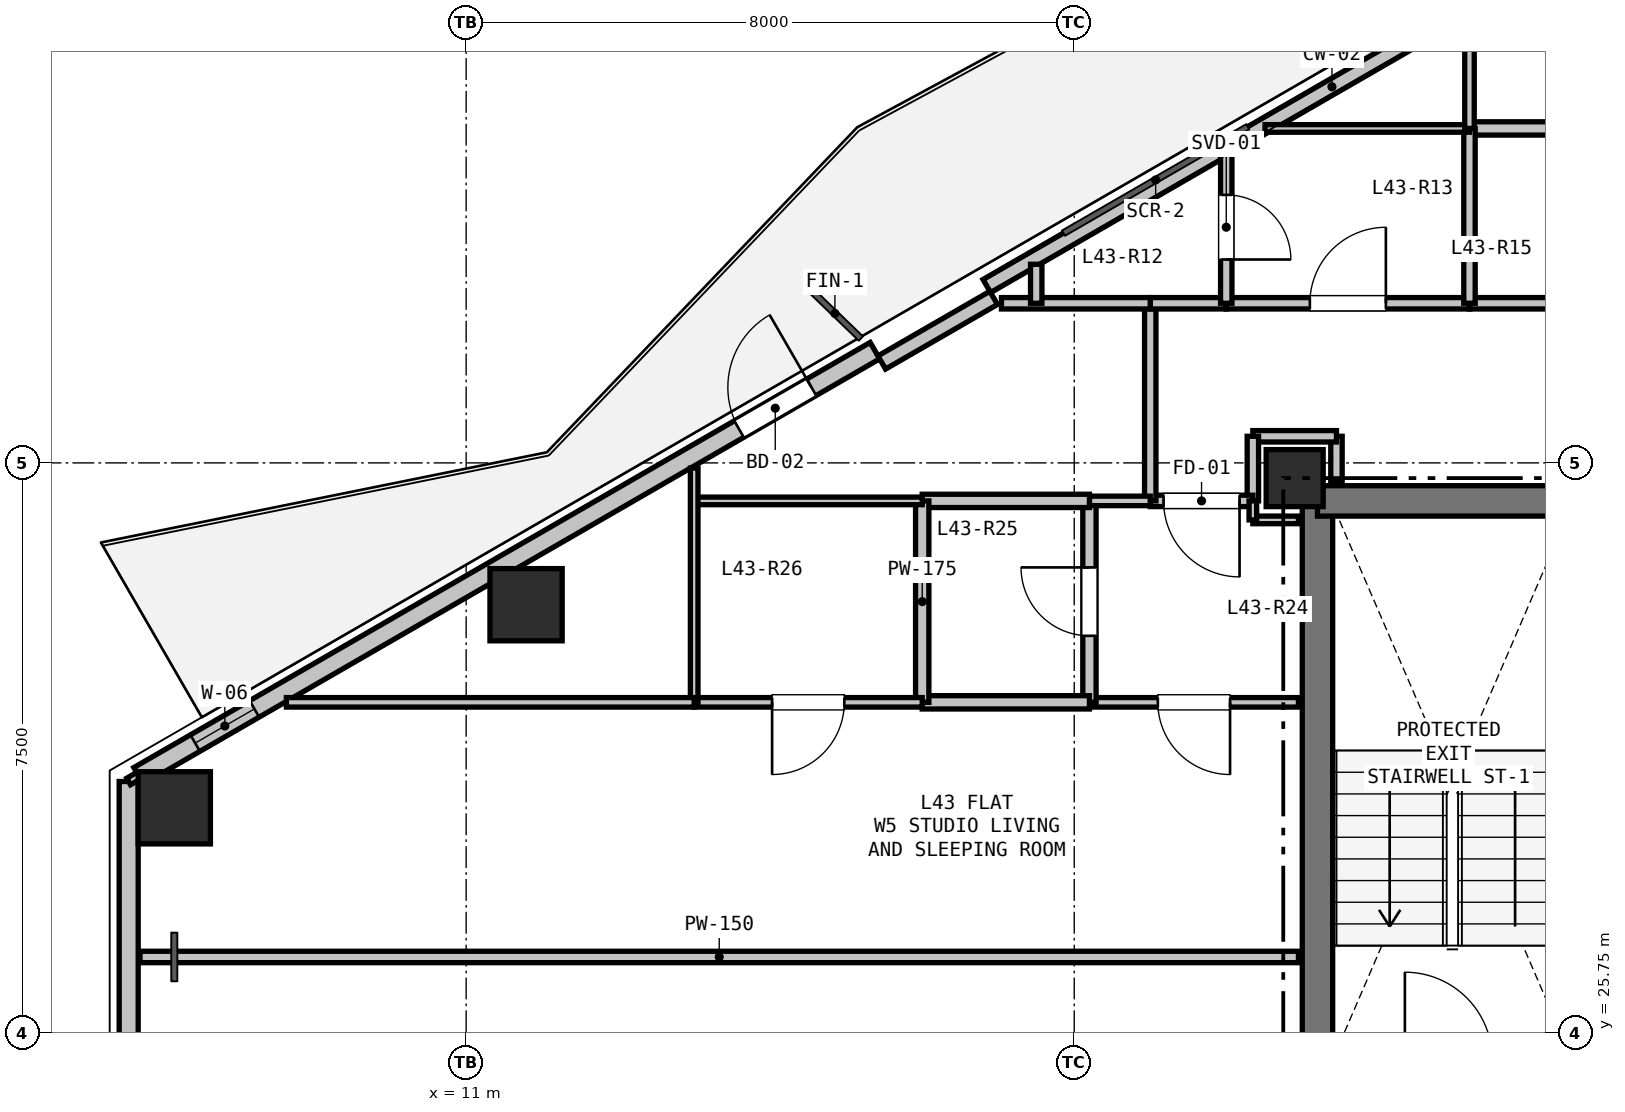
"""IFC4 building model, lengths in metres.
Left out: names, types, materials, properties, quantities, classifications, styles, units other than length and angle.
Written with IfcOpenShell. Run it as: python <this file> out.ifc"""

import sys

from ifc_helpers import new_model, si_unit, direction, frame, frame_2d, origin, origin_2d, place, context, subcontext, project, spatial, rectangle, hollow_rectangle, extrude, element, fill, save


model = new_model("IFC4")
c1 = context("Model", 3, precision=1e-05, world=origin(), true_north=direction((0.0, 1.0)))
c2 = subcontext(c1, "Body", "Model", "MODEL_VIEW")
j1 = project(units=[si_unit("LENGTHUNIT", "METRE"), si_unit("PLANEANGLEUNIT", "RADIAN")], contexts=[c1])
p1 = place(None, origin())
s1 = spatial("IfcSite", under=j1, at=p1, CompositionType="ELEMENT")
p2 = place(p1, origin())
s2 = spatial("IfcBuilding", under=s1, at=p2, CompositionType="ELEMENT")
p3 = place(p2, frame((0.0, 0.0, 154.2)))
s3 = spatial("IfcBuildingStorey", under=s2, at=p3, CompositionType="ELEMENT", Elevation=154.2)
p4 = place(p3, frame((21.9, 33.05, 0.0), z_axis=(0.0, 0.0, 1.0), x_axis=(1.0, 0.0, 0.0)))
e1 = element("IfcColumn", 1, at=p4, inside=s3, PredefinedType="COLUMN", context=c2, shape_type="SweptSolid", body=[
    extrude(rectangle(XDim=0.75, YDim=0.75, at=origin_2d()), origin(), (0.0, 0.0, 1.0), 3.3),
])
for number, where, z_axis, x_axis in (
    (2, (7.16, 28.712, 0.0), (0.0, 0.0, 1.0), (1.0, 0.0, 0.0)),
    (3, (11.788, 31.384, 0.0), (0.0, 0.0, 1.0), (1.0, 0.0, 0.0)),
):
    element("IfcColumn", number, at=place(p3, frame(where, z_axis=z_axis, x_axis=x_axis)), inside=s3, PredefinedType="COLUMN", context=c2, shape_type="SweptSolid", body=[
        extrude(hollow_rectangle(XDim=0.95, YDim=0.95, WallThickness=0.028, at=origin_2d()), origin(), (0.0, 0.0, 1.0), 3.3),
    ])
p5 = place(p3, frame((6.56, 24.441, 0.0), z_axis=(0.0, 0.0, 1.0), x_axis=(0.0, 1.0, 0.0)))
e4 = element("IfcWall", 4, at=p5, inside=s3, PredefinedType="SOLIDWALL", context=c2, shape_type="SweptSolid", body=[
    extrude(rectangle(XDim=4.617, YDim=0.25, at=frame_2d((2.309, 0.0))), origin(), (0.0, 0.0, 1.0), 2.68),
])
p6 = place(p3, frame((6.69, 29.134, 0.0), z_axis=(0.0, 0.0, 1.0), x_axis=(0.866027848477, 0.499995765644, 0.0)))
e5 = element("IfcWall", 5, at=p6, inside=s3, PredefinedType="SOLIDWALL", context=c2, shape_type="SweptSolid", body=[
    extrude(rectangle(XDim=11.186, YDim=0.25, at=frame_2d((5.593, 0.0))), origin(), (0.0, 0.0, 1.0), 2.68),
])
p7 = place(p6, frame((9.122, 0.0, 0.0)))
e6 = element("IfcOpeningElement", 6, at=p7, cuts=e5, PredefinedType="OPENING", context=c2, shape_type="SweptSolid", body=[
    extrude(rectangle(XDim=1.1, YDim=2.1, at=frame_2d((0.55, 1.05))), frame((0.0, 0.135, 0.0), z_axis=(0.0, -1.0, 0.0), x_axis=(1.0, 0.0, 0.0)), (0.0, 0.0, 1.0), 0.27),
])
p8 = place(p6, frame((0.86, 0.0, 0.9)))
e7 = element("IfcOpeningElement", 7, at=p8, cuts=e5, PredefinedType="OPENING", context=c2, shape_type="SweptSolid", body=[
    extrude(rectangle(XDim=0.9, YDim=1.4, at=frame_2d((0.45, 0.7))), frame((0.0, 0.135, 0.0), z_axis=(0.0, -1.0, 0.0), x_axis=(1.0, 0.0, 0.0)), (0.0, 0.0, 1.0), 0.27),
])
p9 = place(p3, frame((17.85, 35.577, 0.0), z_axis=(0.0, 0.0, 1.0), x_axis=(0.866026619769, 0.499997893847, 0.0)))
e8 = element("IfcWall", 8, at=p9, inside=s3, PredefinedType="PARAPET", context=c2, shape_type="SweptSolid", body=[
    extrude(rectangle(XDim=10.486, YDim=0.2, at=frame_2d((5.243, 0.0))), origin(), (0.0, 0.0, 1.0), 0.2),
])
p10 = place(p3, frame((16.468, 34.571, 0.0), z_axis=(0.0, 0.0, 1.0), x_axis=(0.865989465428, 0.500062241894, 0.0)))
e9 = element("IfcWall", 9, at=p10, inside=s3, PredefinedType="PARAPET", context=c2, shape_type="SweptSolid", body=[
    extrude(rectangle(XDim=1.7, YDim=0.2, at=frame_2d((0.85, 0.0))), origin(), (0.0, 0.0, 1.0), 2.68),
])
p11 = place(p3, frame((22.2, 25.4, 0.0), z_axis=(0.0, 0.0, 1.0), x_axis=(0.0, 1.0, 0.0)))
e10 = element("IfcWall", 10, at=p11, inside=s3, PredefinedType="SHEAR", context=c2, shape_type="SweptSolid", body=[
    extrude(rectangle(XDim=7.35, YDim=0.4, at=frame_2d((3.675, 0.0))), origin(), (0.0, 0.0, 1.0), 3.06),
])
p12 = place(p3, frame((22.2, 32.75, 0.0), z_axis=(0.0, 0.0, 1.0), x_axis=(1.0, 0.0, 0.0)))
e11 = element("IfcWall", 11, at=p12, inside=s3, PredefinedType="SHEAR", context=c2, shape_type="SweptSolid", body=[
    extrude(rectangle(XDim=3.45, YDim=0.4, at=frame_2d((1.725, 0.0))), origin(), (0.0, 0.0, 1.0), 3.06),
])
p13 = place(p3, frame((22.45, 33.0, 0.0), z_axis=(0.0, 0.0, 1.0), x_axis=(0.0, 1.0, 0.0)))
e12 = element("IfcWall", 12, at=p13, inside=s3, PredefinedType="PARTITIONING", context=c2, shape_type="SweptSolid", body=[
    extrude(rectangle(XDim=0.6, YDim=0.15, at=frame_2d((0.3, 0.0))), origin(), (0.0, 0.0, 1.0), 2.585),
])
p14 = place(p3, frame((22.45, 33.6, 0.0), z_axis=(0.0, 0.0, 1.0), x_axis=(-1.0, 0.0, 0.0)))
e13 = element("IfcWall", 13, at=p14, inside=s3, PredefinedType="PARTITIONING", context=c2, shape_type="SweptSolid", body=[
    extrude(rectangle(XDim=1.1, YDim=0.15, at=frame_2d((0.55, 0.0))), origin(), (0.0, 0.0, 1.0), 3.06),
])
p15 = place(p3, frame((21.35, 33.6, 0.0), z_axis=(0.0, 0.0, 1.0), x_axis=(0.0, -1.0, 0.0)))
e14 = element("IfcWall", 14, at=p15, inside=s3, PredefinedType="PARTITIONING", context=c2, shape_type="SweptSolid", body=[
    extrude(rectangle(XDim=0.85, YDim=0.15, at=frame_2d((0.425, 0.0))), origin(), (0.0, 0.0, 1.0), 2.433),
])
p16 = place(p3, frame((21.35, 32.75, 0.0), z_axis=(0.0, 0.0, 1.0), x_axis=(-1.0, 0.0, 0.0)))
e15 = element("IfcWall", 15, at=p16, inside=s3, PredefinedType="PARTITIONING", context=c2, shape_type="SweptSolid", body=[
    extrude(rectangle(XDim=1.35, YDim=0.15, at=frame_2d((0.675, 0.0))), origin(), (0.0, 0.0, 1.0), 2.433),
])
p17 = place(p16, frame((0.175, 0.0, 0.0)))
e16 = element("IfcOpeningElement", 16, at=p17, cuts=e15, PredefinedType="OPENING", context=c2, shape_type="SweptSolid", body=[
    extrude(rectangle(XDim=1.0, YDim=2.15, at=frame_2d((0.5, 1.075))), frame((0.0, 0.085, 0.0), z_axis=(0.0, -1.0, 0.0), x_axis=(1.0, 0.0, 0.0)), (0.0, 0.0, 1.0), 0.17),
])
p18 = place(p3, frame((20.0, 32.75, 0.0), z_axis=(0.0, 0.0, 1.0), x_axis=(0.0, 1.0, 0.0)))
e17 = element("IfcWall", 17, at=p18, inside=s3, PredefinedType="PARTITIONING", context=c2, shape_type="SweptSolid", body=[
    extrude(rectangle(XDim=2.6, YDim=0.15, at=frame_2d((1.3, 0.0))), origin(), (0.0, 0.0, 1.0), 2.433),
])
p19 = place(p3, frame((20.0, 35.35, 0.0), z_axis=(0.0, 0.0, 1.0), x_axis=(1.0, 0.0, 0.0)))
e18 = element("IfcWall", 18, at=p19, inside=s3, PredefinedType="PARTITIONING", context=c2, shape_type="SweptSolid", body=[
    extrude(rectangle(XDim=1.0, YDim=0.15, at=frame_2d((0.5, 0.0))), origin(), (0.0, 0.0, 1.0), 3.06),
])
p20 = place(p3, frame((21.0, 35.35, 0.0), z_axis=(0.0, 0.0, 1.0), x_axis=(1.0, 0.0, 0.0)))
e19 = element("IfcWall", 19, at=p20, inside=s3, PredefinedType="PARTITIONING", context=c2, shape_type="SweptSolid", body=[
    extrude(rectangle(XDim=3.2, YDim=0.15, at=frame_2d((1.6, 0.0))), origin(), (0.0, 0.0, 1.0), 3.06),
])
p21 = place(p20, frame((1.1, 0.0, 0.0)))
e20 = element("IfcOpeningElement", 20, at=p21, cuts=e19, PredefinedType="OPENING", context=c2, shape_type="SweptSolid", body=[
    extrude(rectangle(XDim=1.0, YDim=2.15, at=frame_2d((0.5, 1.075))), frame((0.0, 0.085, 0.0), z_axis=(0.0, -1.0, 0.0), x_axis=(1.0, 0.0, 0.0)), (0.0, 0.0, 1.0), 0.17),
])
p22 = place(p3, frame((24.2, 35.35, 0.0), z_axis=(0.0, 0.0, 1.0), x_axis=(1.0, 0.0, 0.0)))
e21 = element("IfcWall", 21, at=p22, inside=s3, PredefinedType="PARTITIONING", context=c2, shape_type="SweptSolid", body=[
    extrude(rectangle(XDim=2.2, YDim=0.15, at=frame_2d((1.1, 0.0))), origin(), (0.0, 0.0, 1.0), 3.06),
])
p23 = place(p3, frame((21.35, 32.5, 0.0), z_axis=(0.0, 0.0, 1.0), x_axis=(1.0, 0.0, 0.0)))
e22 = element("IfcWall", 22, at=p23, inside=s3, PredefinedType="PARTITIONING", context=c2, shape_type="SweptSolid", body=[
    extrude(rectangle(XDim=0.6, YDim=0.1, at=frame_2d((0.3, 0.0))), origin(), (0.0, 0.0, 1.0), 2.585),
])
p24 = place(p3, frame((21.95, 30.1, 0.0), z_axis=(0.0, 0.0, 1.0), x_axis=(-1.0, 0.0, 0.0)))
e23 = element("IfcWall", 23, at=p24, inside=s3, PredefinedType="PARTITIONING", context=c2, shape_type="SweptSolid", body=[
    extrude(rectangle(XDim=2.75, YDim=0.125, at=frame_2d((1.375, 0.0))), origin(), (0.0, 0.0, 1.0), 2.585),
])
p25 = place(p24, frame((0.9, 0.0, 0.0)))
e24 = element("IfcOpeningElement", 24, at=p25, cuts=e23, PredefinedType="OPENING", context=c2, shape_type="SweptSolid", body=[
    extrude(rectangle(XDim=0.95, YDim=2.1, at=frame_2d((0.475, 1.05))), frame((0.0, 0.073, 0.0), z_axis=(0.0, -1.0, 0.0), x_axis=(1.0, 0.0, 0.0)), (0.0, 0.0, 1.0), 0.145),
])
p26 = place(p3, frame((19.2, 30.1, 0.0), z_axis=(0.0, 0.0, 1.0), x_axis=(0.0, 1.0, 0.0)))
e25 = element("IfcWall", 25, at=p26, inside=s3, PredefinedType="PLUMBINGWALL", context=c2, shape_type="SweptSolid", body=[
    extrude(rectangle(XDim=2.65, YDim=0.175, at=frame_2d((1.325, 0.0))), origin(), (0.0, 0.0, 1.0), 2.433),
])
p27 = place(p26, frame((0.875, 0.0, 0.0)))
e26 = element("IfcOpeningElement", 26, at=p27, cuts=e25, PredefinedType="OPENING", context=c2, shape_type="SweptSolid", body=[
    extrude(rectangle(XDim=0.9, YDim=2.1, at=frame_2d((0.45, 1.05))), frame((0.0, 0.097, 0.0), z_axis=(0.0, -1.0, 0.0), x_axis=(1.0, 0.0, 0.0)), (0.0, 0.0, 1.0), 0.195),
])
p28 = place(p3, frame((19.2, 32.75, 0.0), z_axis=(0.0, 0.0, 1.0), x_axis=(1.0, 0.0, 0.0)))
e27 = element("IfcWall", 27, at=p28, inside=s3, PredefinedType="PARTITIONING", context=c2, shape_type="SweptSolid", body=[
    extrude(rectangle(XDim=0.8, YDim=0.125, at=frame_2d((0.4, 0.0))), origin(), (0.0, 0.0, 1.0), 2.433),
])
p29 = place(p3, frame((21.35, 32.75, 0.0), z_axis=(0.0, 0.0, 1.0), x_axis=(0.0, -1.0, 0.0)))
e28 = element("IfcWall", 28, at=p29, inside=s3, PredefinedType="PARTITIONING", context=c2, shape_type="SweptSolid", body=[
    extrude(rectangle(XDim=0.25, YDim=0.1, at=frame_2d((0.125, 0.0))), origin(), (0.0, 0.0, 1.0), 3.06),
])
p30 = place(p3, frame((24.2, 37.65, 0.0), z_axis=(0.0, 0.0, 1.0), x_axis=(1.0, 0.0, 0.0)))
e29 = element("IfcWall", 29, at=p30, inside=s3, PredefinedType="PLUMBINGWALL", context=c2, shape_type="SweptSolid", body=[
    extrude(rectangle(XDim=2.2, YDim=0.175, at=frame_2d((1.1, 0.0))), origin(), (0.0, 0.0, 1.0), 3.06),
])
p31 = place(p3, frame((24.2, 35.35, 0.0), z_axis=(0.0, 0.0, 1.0), x_axis=(0.0, 1.0, 0.0)))
e30 = element("IfcWall", 30, at=p31, inside=s3, PredefinedType="PARTITIONING", context=c2, shape_type="SweptSolid", body=[
    extrude(rectangle(XDim=2.3, YDim=0.15, at=frame_2d((1.15, 0.0))), origin(), (0.0, 0.0, 1.0), 3.06),
])
p32 = place(p3, frame((17.0, 32.75, 0.0), z_axis=(0.0, 0.0, 1.0), x_axis=(1.0, 0.0, 0.0)))
e31 = element("IfcWall", 31, at=p32, inside=s3, PredefinedType="PLUMBINGWALL", context=c2, shape_type="SweptSolid", body=[
    extrude(rectangle(XDim=2.2, YDim=0.175, at=frame_2d((1.1, 0.0))), origin(), (0.0, 0.0, 1.0), 2.433),
])
p33 = place(p3, frame((19.2, 30.1, 0.0), z_axis=(0.0, 0.0, 1.0), x_axis=(-1.0, 0.0, 0.0)))
e32 = element("IfcWall", 32, at=p33, inside=s3, PredefinedType="PLUMBINGWALL", context=c2, shape_type="SweptSolid", body=[
    extrude(rectangle(XDim=2.2, YDim=0.175, at=frame_2d((1.1, 0.0))), origin(), (0.0, 0.0, 1.0), 3.06),
])
p34 = place(p3, frame((17.0, 30.1, 0.0), z_axis=(0.0, 0.0, 1.0), x_axis=(0.0, 1.0, 0.0)))
e33 = element("IfcWall", 33, at=p34, inside=s3, PredefinedType="PLUMBINGWALL", context=c2, shape_type="SweptSolid", body=[
    extrude(rectangle(XDim=2.65, YDim=0.175, at=frame_2d((1.325, 0.0))), origin(), (0.0, 0.0, 1.0), 2.433),
])
p35 = place(p3, frame((14.0, 32.75, 0.0), z_axis=(0.0, 0.0, 1.0), x_axis=(1.0, 0.0, 0.0)))
e34 = element("IfcWall", 34, at=p35, inside=s3, PredefinedType="PARTITIONING", context=c2, shape_type="SweptSolid", body=[
    extrude(rectangle(XDim=3.0, YDim=0.1, at=frame_2d((1.5, 0.0))), origin(), (0.0, 0.0, 1.0), 2.365),
])
p36 = place(p3, frame((17.0, 30.1, 0.0), z_axis=(0.0, 0.0, 1.0), x_axis=(-1.0, 0.0, 0.0)))
e35 = element("IfcWall", 35, at=p36, inside=s3, PredefinedType="PARTITIONING", context=c2, shape_type="SweptSolid", body=[
    extrude(rectangle(XDim=3.0, YDim=0.125, at=frame_2d((1.5, 0.0))), origin(), (0.0, 0.0, 1.0), 3.06),
])
p37 = place(p36, frame((1.025, 0.0, 0.0)))
e36 = element("IfcOpeningElement", 36, at=p37, cuts=e35, PredefinedType="OPENING", context=c2, shape_type="SweptSolid", body=[
    extrude(rectangle(XDim=0.95, YDim=2.1, at=frame_2d((0.475, 1.05))), frame((0.0, 0.073, 0.0), z_axis=(0.0, -1.0, 0.0), x_axis=(1.0, 0.0, 0.0)), (0.0, 0.0, 1.0), 0.145),
])
p38 = place(p3, frame((14.0, 30.1, 0.0), z_axis=(0.0, 0.0, 1.0), x_axis=(0.0, 1.0, 0.0)))
e37 = element("IfcWall", 37, at=p38, inside=s3, PredefinedType="PARTITIONING", context=c2, shape_type="SweptSolid", body=[
    extrude(rectangle(XDim=3.082, YDim=0.1, at=frame_2d((1.541, 0.0))), origin(), (0.0, 0.0, 1.0), 2.365),
])
p39 = place(p3, frame((6.709, 26.75, 0.0), z_axis=(0.0, 0.0, 1.0), x_axis=(1.0, 0.0, 0.0)))
e38 = element("IfcWall", 38, at=p39, inside=s3, PredefinedType="PARTITIONING", context=c2, shape_type="SweptSolid", body=[
    extrude(rectangle(XDim=15.241, YDim=0.15, at=frame_2d((7.62, 0.0))), origin(), (0.0, 0.0, 1.0), 2.585),
])
p40 = place(p3, frame((20.0, 35.35, 0.0), z_axis=(0.0, 0.0, 1.0), x_axis=(-1.0, 0.0, 0.0)))
e39 = element("IfcWall", 39, at=p40, inside=s3, PredefinedType="PARTITIONING", context=c2, shape_type="SweptSolid", body=[
    extrude(rectangle(XDim=1.958, YDim=0.15, at=frame_2d((0.979, 0.0))), origin(), (0.0, 0.0, 1.0), 2.365),
])
p41 = place(p3, frame((18.5, 35.35, 0.0), z_axis=(0.0, 0.0, 1.0), x_axis=(0.0, 1.0, 0.0)))
e40 = element("IfcWall", 40, at=p41, inside=s3, PredefinedType="PARTITIONING", context=c2, shape_type="SweptSolid", body=[
    extrude(rectangle(XDim=0.513, YDim=0.15, at=frame_2d((0.257, 0.0))), origin(), (0.0, 0.0, 1.0), 2.365),
])
p42 = place(p3, frame((21.0, 37.352, 0.0), z_axis=(0.0, 0.0, 1.0), x_axis=(0.0, -1.0, 0.0)))
e41 = element("IfcWall", 41, at=p42, inside=s3, PredefinedType="PARTITIONING", context=c2, shape_type="SweptSolid", body=[
    extrude(rectangle(XDim=2.001, YDim=0.15, at=frame_2d((1.001, 0.0))), origin(), (0.0, 0.0, 1.0), 2.365),
])
p43 = place(p42, frame((0.576, 0.0, 0.0)))
e42 = element("IfcOpeningElement", 42, at=p43, cuts=e41, PredefinedType="OPENING", context=c2, shape_type="SweptSolid", body=[
    extrude(rectangle(XDim=0.85, YDim=2.1, at=frame_2d((0.425, 1.05))), frame((0.0, 0.085, 0.0), z_axis=(0.0, -1.0, 0.0), x_axis=(1.0, 0.0, 0.0)), (0.0, 0.0, 1.0), 0.17),
])
p44 = place(p3, frame((21.51, 37.65, 0.0), z_axis=(0.0, 0.0, 1.0), x_axis=(1.0, 0.0, 0.0)))
e43 = element("IfcWall", 43, at=p44, inside=s3, PredefinedType="PARTITIONING", context=c2, shape_type="SweptSolid", body=[
    extrude(rectangle(XDim=2.69, YDim=0.1, at=frame_2d((1.345, 0.0))), origin(), (0.0, 0.0, 1.0), 2.365),
])
p45 = place(p3, frame((24.2, 37.65, 0.0), z_axis=(0.0, 0.0, 1.0), x_axis=(0.0, 1.0, 0.0)))
e44 = element("IfcWall", 44, at=p45, inside=s3, PredefinedType="PARTITIONING", context=c2, shape_type="SweptSolid", body=[
    extrude(rectangle(XDim=1.549, YDim=0.125, at=frame_2d((0.774, 0.0))), origin(), (0.0, 0.0, 1.0), 2.365),
])
p46 = place(p3, frame((8.635, 30.1, 0.0), z_axis=(0.0, 0.0, 1.0), x_axis=(1.0, 0.0, 0.0)))
e45 = element("IfcWall", 45, at=p46, inside=s3, PredefinedType="PARTITIONING", context=c2, shape_type="SweptSolid", body=[
    extrude(rectangle(XDim=5.365, YDim=0.125, at=frame_2d((2.683, 0.0))), origin(), (0.0, 0.0, 1.0), 2.725),
])
p47 = place(p3, frame((6.56, 29.059, 0.0), z_axis=(0.0, 0.0, 1.0), x_axis=(0.866131372301, 0.499816412211, 0.0)))
e46 = element("IfcWall", 46, at=p47, inside=s3, PredefinedType="PARTITIONING", context=c2, shape_type="SweptSolid", body=[
    extrude(rectangle(XDim=0.15, YDim=0.1, at=frame_2d((0.075, 0.0))), origin(), (0.0, 0.0, 1.0), 3.06),
])
p48 = place(p7, origin())
e47 = element("IfcDoor", 47, at=p48, inside=s3, OperationType="SINGLE_SWING_RIGHT", PredefinedType="DOOR", context=c2, shape_type="SweptSolid", body=[
    extrude(rectangle(XDim=1.1, YDim=2.1, at=frame_2d((0.55, 1.05))), frame((0.0, 0.025, 0.0), z_axis=(0.0, -1.0, 0.0), x_axis=(1.0, 0.0, 0.0)), (0.0, 0.0, 1.0), 0.05),
])
fill(e6, e47)
p49 = place(p8, origin())
e48 = element("IfcWindow", 48, at=p49, inside=s3, PartitioningType="SINGLE_PANEL", PredefinedType="WINDOW", context=c2, shape_type="SweptSolid", body=[
    extrude(rectangle(XDim=0.9, YDim=1.4, at=frame_2d((0.45, 0.7))), frame((0.0, 0.03, 0.0), z_axis=(0.0, -1.0, 0.0), x_axis=(1.0, 0.0, 0.0)), (0.0, 0.0, 1.0), 0.06),
])
fill(e7, e48)
p50 = place(p17, origin())
e49 = element("IfcDoor", 49, at=p50, inside=s3, OperationType="SINGLE_SWING_LEFT", PredefinedType="DOOR", context=c2, shape_type="SweptSolid", body=[
    extrude(rectangle(XDim=1.0, YDim=2.15, at=frame_2d((0.5, 1.075))), frame((0.0, 0.025, 0.0), z_axis=(0.0, -1.0, 0.0), x_axis=(1.0, 0.0, 0.0)), (0.0, 0.0, 1.0), 0.05),
])
fill(e16, e49)
p51 = place(p21, origin())
e50 = element("IfcDoor", 50, at=p51, inside=s3, OperationType="SINGLE_SWING_RIGHT", PredefinedType="DOOR", context=c2, shape_type="SweptSolid", body=[
    extrude(rectangle(XDim=1.0, YDim=2.15, at=frame_2d((0.5, 1.075))), frame((0.0, 0.025, 0.0), z_axis=(0.0, -1.0, 0.0), x_axis=(1.0, 0.0, 0.0)), (0.0, 0.0, 1.0), 0.05),
])
fill(e20, e50)
p52 = place(p27, origin())
e51 = element("IfcDoor", 51, at=p52, inside=s3, OperationType="SINGLE_SWING_RIGHT", PredefinedType="DOOR", context=c2, shape_type="SweptSolid", body=[
    extrude(rectangle(XDim=0.9, YDim=2.1, at=frame_2d((0.45, 1.05))), frame((0.0, 0.025, 0.0), z_axis=(0.0, -1.0, 0.0), x_axis=(1.0, 0.0, 0.0)), (0.0, 0.0, 1.0), 0.05),
])
fill(e26, e51)
p53 = place(p25, origin())
e52 = element("IfcDoor", 52, at=p53, inside=s3, OperationType="SINGLE_SWING_LEFT", PredefinedType="DOOR", context=c2, shape_type="SweptSolid", body=[
    extrude(rectangle(XDim=0.95, YDim=2.1, at=frame_2d((0.475, 1.05))), frame((0.0, 0.025, 0.0), z_axis=(0.0, -1.0, 0.0), x_axis=(1.0, 0.0, 0.0)), (0.0, 0.0, 1.0), 0.05),
])
fill(e24, e52)
p54 = place(p37, origin())
e53 = element("IfcDoor", 53, at=p54, inside=s3, OperationType="SINGLE_SWING_RIGHT", PredefinedType="DOOR", context=c2, shape_type="SweptSolid", body=[
    extrude(rectangle(XDim=0.95, YDim=2.1, at=frame_2d((0.475, 1.05))), frame((0.0, 0.025, 0.0), z_axis=(0.0, -1.0, 0.0), x_axis=(1.0, 0.0, 0.0)), (0.0, 0.0, 1.0), 0.05),
])
fill(e36, e53)
p55 = place(p43, origin())
e54 = element("IfcDoor", 54, at=p55, inside=s3, OperationType="SINGLE_SWING_RIGHT", PredefinedType="DOOR", context=c2, shape_type="SweptSolid", body=[
    extrude(rectangle(XDim=0.85, YDim=2.1, at=frame_2d((0.425, 1.05))), frame((0.0, 0.025, 0.0), z_axis=(0.0, -1.0, 0.0), x_axis=(1.0, 0.0, 0.0)), (0.0, 0.0, 1.0), 0.05),
])
fill(e42, e54)
save(model, sys.argv[1])
